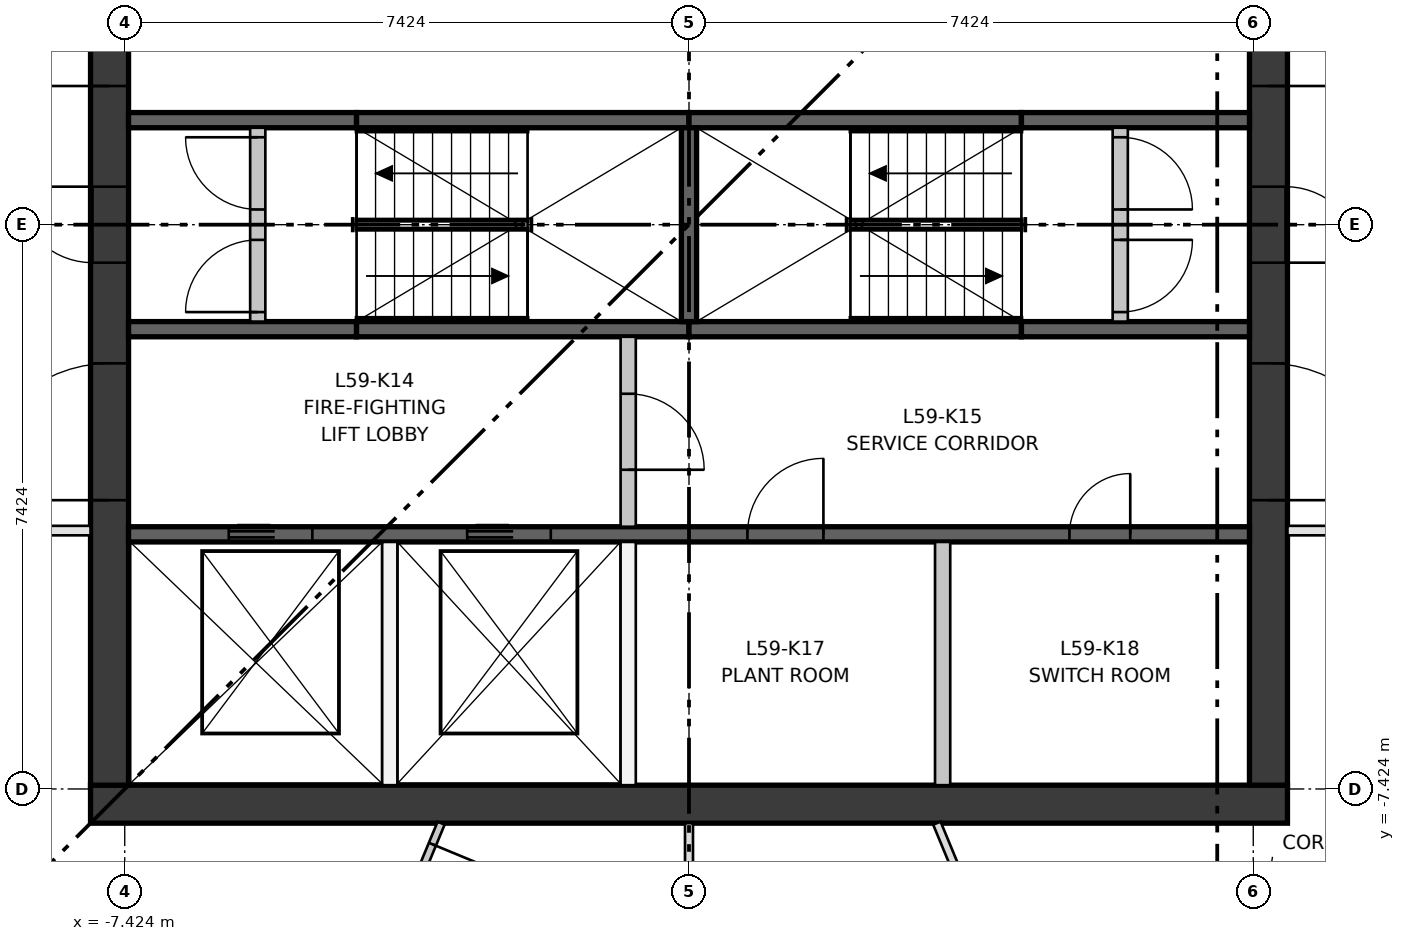
"""IFC4 building model, lengths in metres.
Left out: names, types, materials, properties, quantities, classifications, styles, units other than length and angle.
Written with IfcOpenShell. Run it as: python <this file> out.ifc"""

import sys

from ifc_helpers import new_model, si_unit, direction, frame, frame_2d, origin, place, context, subcontext, project, spatial, rectangle, extrude, element, fill, save


model = new_model("IFC4")
c1 = context("Model", 3, precision=1e-05, world=origin(), true_north=direction((0.0, 1.0)))
c2 = subcontext(c1, "Body", "Model", "MODEL_VIEW")
j1 = project(units=[si_unit("LENGTHUNIT", "METRE"), si_unit("PLANEANGLEUNIT", "RADIAN")], contexts=[c1])
p1 = place(None, origin())
s1 = spatial("IfcSite", under=j1, at=p1, CompositionType="ELEMENT")
p2 = place(p1, origin())
s2 = spatial("IfcBuilding", under=s1, at=p2, CompositionType="ELEMENT")
p3 = place(p2, frame((0.0, 0.0, 217.8)))
s3 = spatial("IfcBuildingStorey", under=s2, at=p3, CompositionType="ELEMENT", Elevation=217.8)
p4 = place(p3, frame((-7.874, -7.624, 0.0), z_axis=(0.0, 0.0, 1.0), x_axis=(1.0, 0.0, 0.0)))
e1 = element("IfcWall", 1, at=p4, inside=s3, PredefinedType="SHEAR", context=c2, shape_type="SweptSolid", body=[
    extrude(rectangle(XDim=15.748, YDim=0.5, at=frame_2d((7.874, 0.0))), origin(), (0.0, 0.0, 1.0), 3.35),
])
p5 = place(p3, frame((-7.624, -7.374, 0.0), z_axis=(0.0, 0.0, 1.0), x_axis=(0.0, 1.0, 0.0)))
e2 = element("IfcWall", 2, at=p5, inside=s3, PredefinedType="SHEAR", context=c2, shape_type="SweptSolid", body=[
    extrude(rectangle(XDim=14.748, YDim=0.5, at=frame_2d((7.374, 0.0))), origin(), (0.0, 0.0, 1.0), 3.35),
])
p6 = place(p5, frame((6.874, 0.0, 0.0)))
e3 = element("IfcOpeningElement", 3, at=p6, cuts=e2, PredefinedType="OPENING", context=c2, shape_type="SweptSolid", body=[
    extrude(rectangle(XDim=1.0, YDim=2.1, at=frame_2d((0.5, 1.05))), frame((0.0, 0.26, 0.0), z_axis=(0.0, -1.0, 0.0), x_axis=(1.0, 0.0, 0.0)), (0.0, 0.0, 1.0), 0.52),
])
p7 = place(p5, frame((3.75, 0.0, 0.0)))
e4 = element("IfcOpeningElement", 4, at=p7, cuts=e2, PredefinedType="OPENING", context=c2, shape_type="SweptSolid", body=[
    extrude(rectangle(XDim=1.8, YDim=2.1, at=frame_2d((0.9, 1.05))), frame((0.0, 0.26, 0.0), z_axis=(0.0, -1.0, 0.0), x_axis=(1.0, 0.0, 0.0)), (0.0, 0.0, 1.0), 0.52),
])
p8 = place(p5, frame((9.198, 0.0, 0.0)))
e5 = element("IfcOpeningElement", 5, at=p8, cuts=e2, PredefinedType="OPENING", context=c2, shape_type="SweptSolid", body=[
    extrude(rectangle(XDim=1.8, YDim=2.1, at=frame_2d((0.9, 1.05))), frame((0.0, 0.26, 0.0), z_axis=(0.0, -1.0, 0.0), x_axis=(1.0, 0.0, 0.0)), (0.0, 0.0, 1.0), 0.52),
])
p9 = place(p3, frame((7.624, -7.374, 0.0), z_axis=(0.0, 0.0, 1.0), x_axis=(0.0, 1.0, 0.0)))
e6 = element("IfcWall", 6, at=p9, inside=s3, PredefinedType="SHEAR", context=c2, shape_type="SweptSolid", body=[
    extrude(rectangle(XDim=14.748, YDim=0.5, at=frame_2d((7.374, 0.0))), origin(), (0.0, 0.0, 1.0), 3.35),
])
p10 = place(p9, frame((6.874, 0.0, 0.0)))
e7 = element("IfcOpeningElement", 7, at=p10, cuts=e6, PredefinedType="OPENING", context=c2, shape_type="SweptSolid", body=[
    extrude(rectangle(XDim=1.0, YDim=2.1, at=frame_2d((0.5, 1.05))), frame((0.0, 0.26, 0.0), z_axis=(0.0, -1.0, 0.0), x_axis=(1.0, 0.0, 0.0)), (0.0, 0.0, 1.0), 0.52),
])
p11 = place(p9, frame((3.75, 0.0, 0.0)))
e8 = element("IfcOpeningElement", 8, at=p11, cuts=e6, PredefinedType="OPENING", context=c2, shape_type="SweptSolid", body=[
    extrude(rectangle(XDim=1.8, YDim=2.1, at=frame_2d((0.9, 1.05))), frame((0.0, 0.26, 0.0), z_axis=(0.0, -1.0, 0.0), x_axis=(1.0, 0.0, 0.0)), (0.0, 0.0, 1.0), 0.52),
])
p12 = place(p9, frame((9.198, 0.0, 0.0)))
e9 = element("IfcOpeningElement", 9, at=p12, cuts=e6, PredefinedType="OPENING", context=c2, shape_type="SweptSolid", body=[
    extrude(rectangle(XDim=1.8, YDim=2.1, at=frame_2d((0.9, 1.05))), frame((0.0, 0.26, 0.0), z_axis=(0.0, -1.0, 0.0), x_axis=(1.0, 0.0, 0.0)), (0.0, 0.0, 1.0), 0.52),
])
p13 = place(p3, frame((-7.374, -4.074, 0.0), z_axis=(0.0, 0.0, 1.0), x_axis=(1.0, 0.0, 0.0)))
e10 = element("IfcWall", 10, at=p13, inside=s3, PredefinedType="SHEAR", context=c2, shape_type="SweptSolid", body=[
    extrude(rectangle(XDim=14.748, YDim=0.2, at=frame_2d((7.374, 0.0))), origin(), (0.0, 0.0, 1.0), 3.0),
])
p14 = place(p13, frame((1.319, 0.0, 0.0)))
e11 = element("IfcOpeningElement", 11, at=p14, cuts=e10, PredefinedType="OPENING", context=c2, shape_type="SweptSolid", body=[
    extrude(rectangle(XDim=1.1, YDim=2.1, at=frame_2d((0.55, 1.05))), frame((0.0, 0.11, 0.0), z_axis=(0.0, -1.0, 0.0), x_axis=(1.0, 0.0, 0.0)), (0.0, 0.0, 1.0), 0.22),
])
p15 = place(p13, frame((4.456, 0.0, 0.0)))
e12 = element("IfcOpeningElement", 12, at=p15, cuts=e10, PredefinedType="OPENING", context=c2, shape_type="SweptSolid", body=[
    extrude(rectangle(XDim=1.1, YDim=2.1, at=frame_2d((0.55, 1.05))), frame((0.0, 0.11, 0.0), z_axis=(0.0, -1.0, 0.0), x_axis=(1.0, 0.0, 0.0)), (0.0, 0.0, 1.0), 0.22),
])
p16 = place(p13, frame((8.143, 0.0, 0.0)))
e13 = element("IfcOpeningElement", 13, at=p16, cuts=e10, PredefinedType="OPENING", context=c2, shape_type="SweptSolid", body=[
    extrude(rectangle(XDim=1.0, YDim=2.1, at=frame_2d((0.5, 1.05))), frame((0.0, 0.11, 0.0), z_axis=(0.0, -1.0, 0.0), x_axis=(1.0, 0.0, 0.0)), (0.0, 0.0, 1.0), 0.22),
])
p17 = place(p13, frame((12.379, 0.0, 0.0)))
e14 = element("IfcOpeningElement", 14, at=p17, cuts=e10, PredefinedType="OPENING", context=c2, shape_type="SweptSolid", body=[
    extrude(rectangle(XDim=0.8, YDim=2.1, at=frame_2d((0.4, 1.05))), frame((0.0, 0.11, 0.0), z_axis=(0.0, -1.0, 0.0), x_axis=(1.0, 0.0, 0.0)), (0.0, 0.0, 1.0), 0.22),
])
p18 = place(p3, frame((-7.374, -1.375, 0.0), z_axis=(0.0, 0.0, 1.0), x_axis=(1.0, 0.0, 0.0)))
e15 = element("IfcWall", 15, at=p18, inside=s3, PredefinedType="SHEAR", context=c2, shape_type="SweptSolid", body=[
    extrude(rectangle(XDim=3.0, YDim=0.2, at=frame_2d((1.5, 0.0))), origin(), (0.0, 0.0, 1.0), 3.0),
])
for number, where, z_axis, x_axis in (
    (16, (-4.374, -1.375, 0.0), (0.0, 0.0, 1.0), (1.0, 0.0, 0.0)),
    (17, (0.0, -1.375, 0.0), (0.0, 0.0, 1.0), (1.0, 0.0, 0.0)),
):
    element("IfcWall", number, at=place(p3, frame(where, z_axis=z_axis, x_axis=x_axis)), inside=s3, PredefinedType="SHEAR", context=c2, shape_type="SweptSolid", body=[
        extrude(rectangle(XDim=4.374, YDim=0.2, at=frame_2d((2.187, 0.0))), origin(), (0.0, 0.0, 1.0), 3.0),
    ])
for number, where, z_axis, x_axis in (
    (18, (4.374, -1.375, 0.0), (0.0, 0.0, 1.0), (1.0, 0.0, 0.0)),
    (19, (-7.374, 1.375, 0.0), (0.0, 0.0, 1.0), (1.0, 0.0, 0.0)),
):
    element("IfcWall", number, at=place(p3, frame(where, z_axis=z_axis, x_axis=x_axis)), inside=s3, PredefinedType="SHEAR", context=c2, shape_type="SweptSolid", body=[
        extrude(rectangle(XDim=3.0, YDim=0.2, at=frame_2d((1.5, 0.0))), origin(), (0.0, 0.0, 1.0), 3.0),
    ])
for number, where, z_axis, x_axis in (
    (20, (-4.374, 1.375, 0.0), (0.0, 0.0, 1.0), (1.0, 0.0, 0.0)),
    (21, (0.0, 1.375, 0.0), (0.0, 0.0, 1.0), (1.0, 0.0, 0.0)),
):
    element("IfcWall", number, at=place(p3, frame(where, z_axis=z_axis, x_axis=x_axis)), inside=s3, PredefinedType="SHEAR", context=c2, shape_type="SweptSolid", body=[
        extrude(rectangle(XDim=4.374, YDim=0.2, at=frame_2d((2.187, 0.0))), origin(), (0.0, 0.0, 1.0), 3.0),
    ])
p19 = place(p3, frame((4.374, 1.375, 0.0), z_axis=(0.0, 0.0, 1.0), x_axis=(1.0, 0.0, 0.0)))
e22 = element("IfcWall", 22, at=p19, inside=s3, PredefinedType="SHEAR", context=c2, shape_type="SweptSolid", body=[
    extrude(rectangle(XDim=3.0, YDim=0.2, at=frame_2d((1.5, 0.0))), origin(), (0.0, 0.0, 1.0), 3.0),
])
p20 = place(p3, frame((0.0, -1.275, 0.0), z_axis=(0.0, 0.0, 1.0), x_axis=(0.0, 1.0, 0.0)))
e23 = element("IfcWall", 23, at=p20, inside=s3, PredefinedType="SHEAR", context=c2, shape_type="SweptSolid", body=[
    extrude(rectangle(XDim=2.55, YDim=0.2, at=frame_2d((1.275, 0.0))), origin(), (0.0, 0.0, 1.0), 3.0),
])
for number, where, z_axis, x_axis in (
    (24, (-3.937, -7.374, 0.0), (0.0, 0.0, 1.0), (0.0, 1.0, 0.0)),
    (25, (-0.8, -7.374, 0.0), (0.0, 0.0, 1.0), (0.0, 1.0, 0.0)),
):
    element("IfcWall", number, at=place(p3, frame(where, z_axis=z_axis, x_axis=x_axis)), inside=s3, PredefinedType="PARTITIONING", context=c2, shape_type="SweptSolid", body=[
        extrude(rectangle(XDim=3.2, YDim=0.2, at=frame_2d((1.6, 0.0))), origin(), (0.0, 0.0, 1.0), 3.0),
    ])
p21 = place(p3, frame((-0.8, -3.974, 0.0), z_axis=(0.0, 0.0, 1.0), x_axis=(0.0, 1.0, 0.0)))
e26 = element("IfcWall", 26, at=p21, inside=s3, PredefinedType="PARTITIONING", context=c2, shape_type="SweptSolid", body=[
    extrude(rectangle(XDim=2.499, YDim=0.2, at=frame_2d((1.25, 0.0))), origin(), (0.0, 0.0, 1.0), 3.0),
])
p22 = place(p21, frame((0.75, 0.0, 0.0)))
e27 = element("IfcOpeningElement", 27, at=p22, cuts=e26, PredefinedType="OPENING", context=c2, shape_type="SweptSolid", body=[
    extrude(rectangle(XDim=1.0, YDim=2.1, at=frame_2d((0.5, 1.05))), frame((0.0, 0.11, 0.0), z_axis=(0.0, -1.0, 0.0), x_axis=(1.0, 0.0, 0.0)), (0.0, 0.0, 1.0), 0.22),
])
p23 = place(p3, frame((3.337, -7.374, 0.0), z_axis=(0.0, 0.0, 1.0), x_axis=(0.0, 1.0, 0.0)))
e28 = element("IfcWall", 28, at=p23, inside=s3, PredefinedType="PARTITIONING", context=c2, shape_type="SweptSolid", body=[
    extrude(rectangle(XDim=3.2, YDim=0.2, at=frame_2d((1.6, 0.0))), origin(), (0.0, 0.0, 1.0), 3.0),
])
p24 = place(p3, frame((-5.674, -1.275, 0.0), z_axis=(0.0, 0.0, 1.0), x_axis=(0.0, 1.0, 0.0)))
e29 = element("IfcWall", 29, at=p24, inside=s3, PredefinedType="PARTITIONING", context=c2, shape_type="SweptSolid", body=[
    extrude(rectangle(XDim=2.55, YDim=0.2, at=frame_2d((1.275, 0.0))), origin(), (0.0, 0.0, 1.0), 3.0),
])
p25 = place(p24, frame((0.125, 0.0, 0.0)))
e30 = element("IfcOpeningElement", 30, at=p25, cuts=e29, PredefinedType="OPENING", context=c2, shape_type="SweptSolid", body=[
    extrude(rectangle(XDim=0.95, YDim=2.1, at=frame_2d((0.475, 1.05))), frame((0.0, 0.11, 0.0), z_axis=(0.0, -1.0, 0.0), x_axis=(1.0, 0.0, 0.0)), (0.0, 0.0, 1.0), 0.22),
])
p26 = place(p24, frame((1.475, 0.0, 0.0)))
e31 = element("IfcOpeningElement", 31, at=p26, cuts=e29, PredefinedType="OPENING", context=c2, shape_type="SweptSolid", body=[
    extrude(rectangle(XDim=0.95, YDim=2.1, at=frame_2d((0.475, 1.05))), frame((0.0, 0.11, 0.0), z_axis=(0.0, -1.0, 0.0), x_axis=(1.0, 0.0, 0.0)), (0.0, 0.0, 1.0), 0.22),
])
p27 = place(p3, frame((5.674, -1.275, 0.0), z_axis=(0.0, 0.0, 1.0), x_axis=(0.0, 1.0, 0.0)))
e32 = element("IfcWall", 32, at=p27, inside=s3, PredefinedType="PARTITIONING", context=c2, shape_type="SweptSolid", body=[
    extrude(rectangle(XDim=2.55, YDim=0.2, at=frame_2d((1.275, 0.0))), origin(), (0.0, 0.0, 1.0), 3.0),
])
p28 = place(p27, frame((0.125, 0.0, 0.0)))
e33 = element("IfcOpeningElement", 33, at=p28, cuts=e32, PredefinedType="OPENING", context=c2, shape_type="SweptSolid", body=[
    extrude(rectangle(XDim=0.95, YDim=2.1, at=frame_2d((0.475, 1.05))), frame((0.0, 0.11, 0.0), z_axis=(0.0, -1.0, 0.0), x_axis=(1.0, 0.0, 0.0)), (0.0, 0.0, 1.0), 0.22),
])
p29 = place(p27, frame((1.475, 0.0, 0.0)))
e34 = element("IfcOpeningElement", 34, at=p29, cuts=e32, PredefinedType="OPENING", context=c2, shape_type="SweptSolid", body=[
    extrude(rectangle(XDim=0.95, YDim=2.1, at=frame_2d((0.475, 1.05))), frame((0.0, 0.11, 0.0), z_axis=(0.0, -1.0, 0.0), x_axis=(1.0, 0.0, 0.0)), (0.0, 0.0, 1.0), 0.22),
])
p30 = place(p3, frame((10.191, -4.024, 0.0), z_axis=(0.0, 0.0, 1.0), x_axis=(-1.0, 0.0, 0.0)))
e35 = element("IfcWall", 35, at=p30, inside=s3, PredefinedType="PARTITIONING", context=c2, shape_type="SweptSolid", body=[
    extrude(rectangle(XDim=2.317, YDim=0.125, at=frame_2d((1.158, 0.0))), origin(), (0.0, 0.0, 1.0), 3.0),
])
p31 = place(p30, frame((0.7, 0.0, 0.0)))
e36 = element("IfcOpeningElement", 36, at=p31, cuts=e35, PredefinedType="OPENING", context=c2, shape_type="SweptSolid", body=[
    extrude(rectangle(XDim=1.0, YDim=2.1, at=frame_2d((0.5, 1.05))), frame((0.0, 0.073, 0.0), z_axis=(0.0, -1.0, 0.0), x_axis=(1.0, 0.0, 0.0)), (0.0, 0.0, 1.0), 0.145),
])
p32 = place(p3, frame((-7.874, -4.024, 0.0), z_axis=(0.0, 0.0, 1.0), x_axis=(-1.0, 0.0, 0.0)))
e37 = element("IfcWall", 37, at=p32, inside=s3, PredefinedType="PARTITIONING", context=c2, shape_type="SweptSolid", body=[
    extrude(rectangle(XDim=2.422, YDim=0.125, at=frame_2d((1.211, 0.0))), origin(), (0.0, 0.0, 1.0), 3.0),
])
p33 = place(p32, frame((0.7, 0.0, 0.0)))
e38 = element("IfcOpeningElement", 38, at=p33, cuts=e37, PredefinedType="OPENING", context=c2, shape_type="SweptSolid", body=[
    extrude(rectangle(XDim=1.0, YDim=2.1, at=frame_2d((0.5, 1.05))), frame((0.0, 0.073, 0.0), z_axis=(0.0, -1.0, 0.0), x_axis=(1.0, 0.0, 0.0)), (0.0, 0.0, 1.0), 0.145),
])
p34 = place(p3, frame((-3.261, -7.874, 0.0), z_axis=(0.0, 0.0, 1.0), x_axis=(-0.382718376354, -0.923865057463, 0.0)))
e39 = element("IfcWall", 39, at=p34, inside=s3, PredefinedType="PARTITIONING", context=c2, shape_type="SweptSolid", body=[
    extrude(rectangle(XDim=1.627, YDim=0.1, at=frame_2d((0.813, 0.0))), origin(), (0.0, 0.0, 1.0), 3.0),
])
p35 = place(p34, frame((0.3, 0.0, 0.0)))
e40 = element("IfcOpeningElement", 40, at=p35, cuts=e39, PredefinedType="OPENING", context=c2, shape_type="SweptSolid", body=[
    extrude(rectangle(XDim=1.0, YDim=2.1, at=frame_2d((0.5, 1.05))), frame((0.0, 0.06, 0.0), z_axis=(0.0, -1.0, 0.0), x_axis=(1.0, 0.0, 0.0)), (0.0, 0.0, 1.0), 0.12),
])
p36 = place(p3, frame((0.0, -7.874, 0.0), z_axis=(0.0, 0.0, 1.0), x_axis=(0.0, -1.0, 0.0)))
e41 = element("IfcWall", 41, at=p36, inside=s3, PredefinedType="PARTITIONING", context=c2, shape_type="SweptSolid", body=[
    extrude(rectangle(XDim=2.276, YDim=0.105, at=frame_2d((1.138, 0.0))), origin(), (0.0, 0.0, 1.0), 3.0),
])
p37 = place(p36, frame((0.6, 0.0, 0.0)))
e42 = element("IfcOpeningElement", 42, at=p37, cuts=e41, PredefinedType="OPENING", context=c2, shape_type="SweptSolid", body=[
    extrude(rectangle(XDim=1.0, YDim=2.1, at=frame_2d((0.5, 1.05))), frame((0.0, 0.062, 0.0), z_axis=(0.0, -1.0, 0.0), x_axis=(1.0, 0.0, 0.0)), (0.0, 0.0, 1.0), 0.125),
])
p38 = place(p3, frame((3.261, -7.874, 0.0), z_axis=(0.0, 0.0, 1.0), x_axis=(0.382718376354, -0.923865057463, 0.0)))
e43 = element("IfcWall", 43, at=p38, inside=s3, PredefinedType="PARTITIONING", context=c2, shape_type="SweptSolid", body=[
    extrude(rectangle(XDim=1.627, YDim=0.105, at=frame_2d((0.813, 0.0))), origin(), (0.0, 0.0, 1.0), 3.0),
])
p39 = place(p14, origin())
e44 = element("IfcDoor", 44, at=p39, inside=s3, OperationType="DOUBLE_DOOR_SLIDING", PredefinedType="DOOR", context=c2, shape_type="SweptSolid", body=[
    extrude(rectangle(XDim=1.1, YDim=2.1, at=frame_2d((0.55, 1.05))), frame((0.0, 0.025, 0.0), z_axis=(0.0, -1.0, 0.0), x_axis=(1.0, 0.0, 0.0)), (0.0, 0.0, 1.0), 0.05),
])
fill(e11, e44)
p40 = place(p15, origin())
e45 = element("IfcDoor", 45, at=p40, inside=s3, OperationType="DOUBLE_DOOR_SLIDING", PredefinedType="DOOR", context=c2, shape_type="SweptSolid", body=[
    extrude(rectangle(XDim=1.1, YDim=2.1, at=frame_2d((0.55, 1.05))), frame((0.0, 0.025, 0.0), z_axis=(0.0, -1.0, 0.0), x_axis=(1.0, 0.0, 0.0)), (0.0, 0.0, 1.0), 0.05),
])
fill(e12, e45)
p41 = place(p25, origin())
e46 = element("IfcDoor", 46, at=p41, inside=s3, OperationType="SINGLE_SWING_LEFT", PredefinedType="DOOR", context=c2, shape_type="SweptSolid", body=[
    extrude(rectangle(XDim=0.95, YDim=2.1, at=frame_2d((0.475, 1.05))), frame((0.0, 0.025, 0.0), z_axis=(0.0, -1.0, 0.0), x_axis=(1.0, 0.0, 0.0)), (0.0, 0.0, 1.0), 0.05),
])
fill(e30, e46)
p42 = place(p26, origin())
e47 = element("IfcDoor", 47, at=p42, inside=s3, OperationType="SINGLE_SWING_RIGHT", PredefinedType="DOOR", context=c2, shape_type="SweptSolid", body=[
    extrude(rectangle(XDim=0.95, YDim=2.1, at=frame_2d((0.475, 1.05))), frame((0.0, 0.025, 0.0), z_axis=(0.0, -1.0, 0.0), x_axis=(1.0, 0.0, 0.0)), (0.0, 0.0, 1.0), 0.05),
])
fill(e31, e47)
p43 = place(p28, frame((0.95, 0.0, 0.0), z_axis=(0.0, 0.0, 1.0), x_axis=(-1.0, 0.0, 0.0)))
e48 = element("IfcDoor", 48, at=p43, inside=s3, OperationType="SINGLE_SWING_RIGHT", PredefinedType="DOOR", context=c2, shape_type="SweptSolid", body=[
    extrude(rectangle(XDim=0.95, YDim=2.1, at=frame_2d((0.475, 1.05))), frame((0.0, 0.025, 0.0), z_axis=(0.0, -1.0, 0.0), x_axis=(1.0, 0.0, 0.0)), (0.0, 0.0, 1.0), 0.05),
])
fill(e33, e48)
p44 = place(p29, frame((0.95, 0.0, 0.0), z_axis=(0.0, 0.0, 1.0), x_axis=(-1.0, 0.0, 0.0)))
e49 = element("IfcDoor", 49, at=p44, inside=s3, OperationType="SINGLE_SWING_LEFT", PredefinedType="DOOR", context=c2, shape_type="SweptSolid", body=[
    extrude(rectangle(XDim=0.95, YDim=2.1, at=frame_2d((0.475, 1.05))), frame((0.0, 0.025, 0.0), z_axis=(0.0, -1.0, 0.0), x_axis=(1.0, 0.0, 0.0)), (0.0, 0.0, 1.0), 0.05),
])
fill(e34, e49)
p45 = place(p22, frame((1.0, 0.0, 0.0), z_axis=(0.0, 0.0, 1.0), x_axis=(-1.0, 0.0, 0.0)))
e50 = element("IfcDoor", 50, at=p45, inside=s3, OperationType="SINGLE_SWING_LEFT", PredefinedType="DOOR", context=c2, shape_type="SweptSolid", body=[
    extrude(rectangle(XDim=1.0, YDim=2.1, at=frame_2d((0.5, 1.05))), frame((0.0, 0.025, 0.0), z_axis=(0.0, -1.0, 0.0), x_axis=(1.0, 0.0, 0.0)), (0.0, 0.0, 1.0), 0.05),
])
fill(e27, e50)
p46 = place(p16, origin())
e51 = element("IfcDoor", 51, at=p46, inside=s3, OperationType="SINGLE_SWING_RIGHT", PredefinedType="DOOR", context=c2, shape_type="SweptSolid", body=[
    extrude(rectangle(XDim=1.0, YDim=2.1, at=frame_2d((0.5, 1.05))), frame((0.0, 0.025, 0.0), z_axis=(0.0, -1.0, 0.0), x_axis=(1.0, 0.0, 0.0)), (0.0, 0.0, 1.0), 0.05),
])
fill(e13, e51)
p47 = place(p17, origin())
e52 = element("IfcDoor", 52, at=p47, inside=s3, OperationType="SINGLE_SWING_RIGHT", PredefinedType="DOOR", context=c2, shape_type="SweptSolid", body=[
    extrude(rectangle(XDim=0.8, YDim=2.1, at=frame_2d((0.4, 1.05))), frame((0.0, 0.025, 0.0), z_axis=(0.0, -1.0, 0.0), x_axis=(1.0, 0.0, 0.0)), (0.0, 0.0, 1.0), 0.05),
])
fill(e14, e52)
p48 = place(p6, origin())
e53 = element("IfcDoor", 53, at=p48, inside=s3, OperationType="SINGLE_SWING_RIGHT", PredefinedType="DOOR", context=c2, shape_type="SweptSolid", body=[
    extrude(rectangle(XDim=1.0, YDim=2.1, at=frame_2d((0.5, 1.05))), frame((0.0, 0.25, 0.0), z_axis=(0.0, -1.0, 0.0), x_axis=(1.0, 0.0, 0.0)), (0.0, 0.0, 1.0), 0.05),
])
fill(e3, e53)
p49 = place(p7, origin())
e54 = element("IfcDoor", 54, at=p49, inside=s3, OperationType="DOUBLE_DOOR_SINGLE_SWING", PredefinedType="DOOR", context=c2, shape_type="SweptSolid", body=[
    extrude(rectangle(XDim=1.8, YDim=2.1, at=frame_2d((0.9, 1.05))), frame((0.0, 0.025, 0.0), z_axis=(0.0, -1.0, 0.0), x_axis=(1.0, 0.0, 0.0)), (0.0, 0.0, 1.0), 0.05),
])
fill(e4, e54)
p50 = place(p8, origin())
e55 = element("IfcDoor", 55, at=p50, inside=s3, OperationType="DOUBLE_DOOR_SINGLE_SWING", PredefinedType="DOOR", context=c2, shape_type="SweptSolid", body=[
    extrude(rectangle(XDim=1.8, YDim=2.1, at=frame_2d((0.9, 1.05))), frame((0.0, 0.025, 0.0), z_axis=(0.0, -1.0, 0.0), x_axis=(1.0, 0.0, 0.0)), (0.0, 0.0, 1.0), 0.05),
])
fill(e5, e55)
p51 = place(p10, frame((1.0, 0.0, 0.0), z_axis=(0.0, 0.0, 1.0), x_axis=(-1.0, 0.0, 0.0)))
e56 = element("IfcDoor", 56, at=p51, inside=s3, OperationType="SINGLE_SWING_LEFT", PredefinedType="DOOR", context=c2, shape_type="SweptSolid", body=[
    extrude(rectangle(XDim=1.0, YDim=2.1, at=frame_2d((0.5, 1.05))), frame((0.0, 0.25, 0.0), z_axis=(0.0, -1.0, 0.0), x_axis=(1.0, 0.0, 0.0)), (0.0, 0.0, 1.0), 0.05),
])
fill(e7, e56)
p52 = place(p11, frame((1.8, 0.0, 0.0), z_axis=(0.0, 0.0, 1.0), x_axis=(-1.0, 0.0, 0.0)))
e57 = element("IfcDoor", 57, at=p52, inside=s3, OperationType="DOUBLE_DOOR_SINGLE_SWING", PredefinedType="DOOR", context=c2, shape_type="SweptSolid", body=[
    extrude(rectangle(XDim=1.8, YDim=2.1, at=frame_2d((0.9, 1.05))), frame((0.0, 0.025, 0.0), z_axis=(0.0, -1.0, 0.0), x_axis=(1.0, 0.0, 0.0)), (0.0, 0.0, 1.0), 0.05),
])
fill(e8, e57)
p53 = place(p12, frame((1.8, 0.0, 0.0), z_axis=(0.0, 0.0, 1.0), x_axis=(-1.0, 0.0, 0.0)))
e58 = element("IfcDoor", 58, at=p53, inside=s3, OperationType="DOUBLE_DOOR_SINGLE_SWING", PredefinedType="DOOR", context=c2, shape_type="SweptSolid", body=[
    extrude(rectangle(XDim=1.8, YDim=2.1, at=frame_2d((0.9, 1.05))), frame((0.0, 0.025, 0.0), z_axis=(0.0, -1.0, 0.0), x_axis=(1.0, 0.0, 0.0)), (0.0, 0.0, 1.0), 0.05),
])
fill(e9, e58)
p54 = place(p35, origin())
e59 = element("IfcDoor", 59, at=p54, inside=s3, OperationType="SINGLE_SWING_LEFT", PredefinedType="DOOR", context=c2, shape_type="SweptSolid", body=[
    extrude(rectangle(XDim=1.0, YDim=2.1, at=frame_2d((0.5, 1.05))), frame((0.0, 0.025, 0.0), z_axis=(0.0, -1.0, 0.0), x_axis=(1.0, 0.0, 0.0)), (0.0, 0.0, 1.0), 0.05),
])
fill(e40, e59)
save(model, sys.argv[1])
